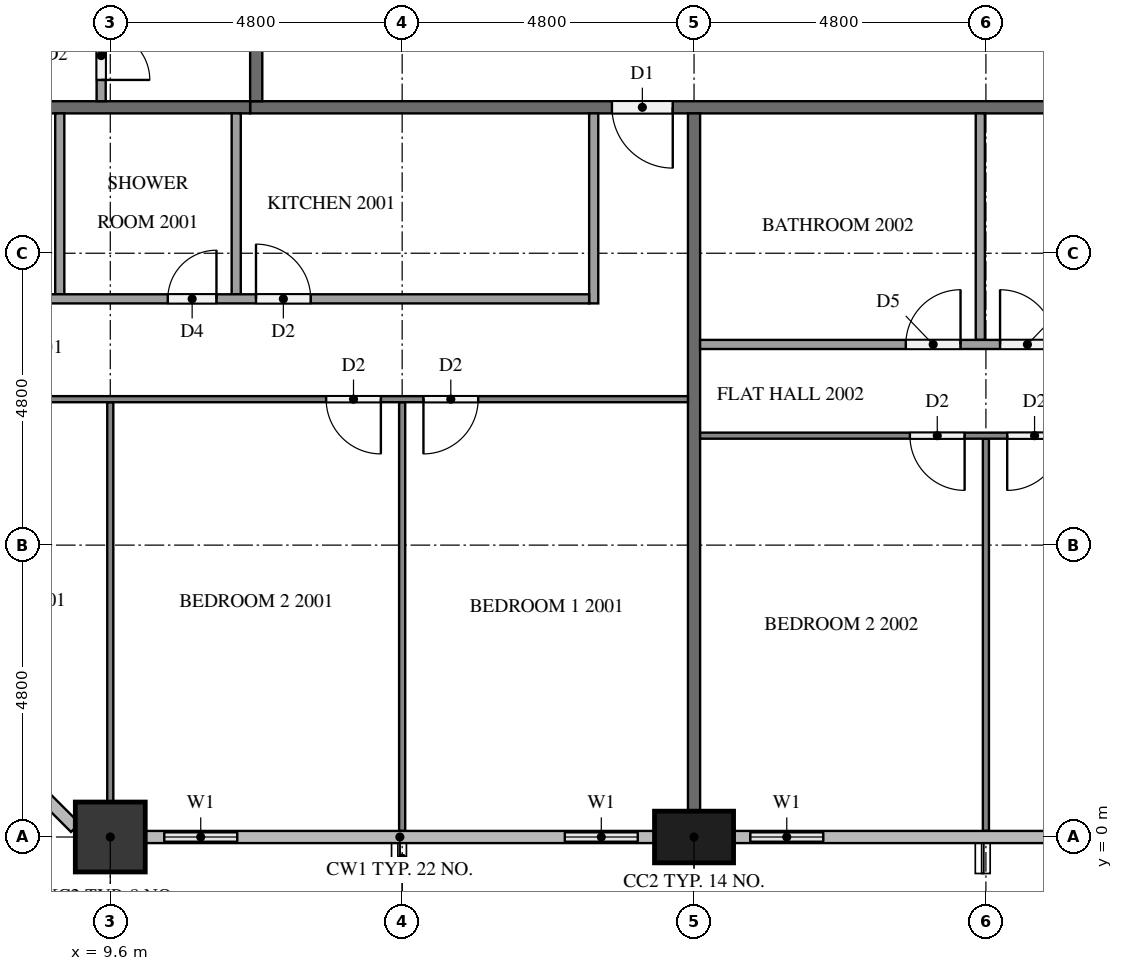
"""IFC4 building model, lengths in metres.
Left out: names, types, materials, properties, quantities, classifications, styles, units other than length and angle.
Written with IfcOpenShell. Run it as: python <this file> out.ifc"""

import sys

from ifc_helpers import new_model, si_unit, direction, frame, frame_2d, origin, origin_2d, place, context, subcontext, project, spatial, rectangle, extrude, element, fill, save


model = new_model("IFC4")
c1 = context("Model", 3, precision=1e-05, world=origin(), true_north=direction((0.0, 1.0)))
c2 = subcontext(c1, "Body", "Model", "MODEL_VIEW")
j1 = project(units=[si_unit("LENGTHUNIT", "METRE"), si_unit("PLANEANGLEUNIT", "RADIAN")], contexts=[c1])
p1 = place(None, origin())
s1 = spatial("IfcSite", under=j1, at=p1, CompositionType="ELEMENT")
p2 = place(p1, origin())
s2 = spatial("IfcBuilding", under=s1, at=p2, CompositionType="ELEMENT")
p3 = place(p2, frame((0.0, 0.0, 80.3)))
s3 = spatial("IfcBuildingStorey", under=s2, at=p3, CompositionType="ELEMENT", Elevation=80.3)
p4 = place(p3, frame((9.6, 0.0, 0.0), z_axis=(0.0, 0.0, 1.0), x_axis=(1.0, 0.0, 0.0)))
e1 = element("IfcColumn", 1, at=p4, inside=s3, PredefinedType="COLUMN", context=c2, shape_type="SweptSolid", body=[
    extrude(rectangle(XDim=1.15, YDim=1.15, at=origin_2d()), origin(), (0.0, 0.0, 1.0), 3.1),
])
p5 = place(p3, frame((19.2, 0.0, 0.0), z_axis=(0.0, 0.0, 1.0), x_axis=(1.0, 0.0, 0.0)))
e2 = element("IfcColumn", 2, at=p5, inside=s3, PredefinedType="COLUMN", context=c2, shape_type="SweptSolid", body=[
    extrude(rectangle(XDim=1.3, YDim=0.85, at=origin_2d()), origin(), (0.0, 0.0, 1.0), 3.1),
])
p6 = place(p3, frame((10.175, 0.0, 0.0), z_axis=(0.0, 0.0, 1.0), x_axis=(1.0, 0.0, 0.0)))
e3 = element("IfcWall", 3, at=p6, inside=s3, PredefinedType="SOLIDWALL", context=c2, shape_type="SweptSolid", body=[
    extrude(rectangle(XDim=1.825, YDim=0.15, at=frame_2d((0.913, 0.0))), origin(), (0.0, 0.0, 1.0), 3.1),
])
p7 = place(p6, frame((0.312, 0.0, 0.9)))
e4 = element("IfcOpeningElement", 4, at=p7, cuts=e3, PredefinedType="OPENING", context=c2, shape_type="SweptSolid", body=[
    extrude(rectangle(XDim=1.2, YDim=1.4, at=frame_2d((0.6, 0.7))), frame((0.0, 0.085, 0.0), z_axis=(0.0, -1.0, 0.0), x_axis=(1.0, 0.0, 0.0)), (0.0, 0.0, 1.0), 0.17),
])
p8 = place(p3, frame((16.8, 0.0, 0.0), z_axis=(0.0, 0.0, 1.0), x_axis=(1.0, 0.0, 0.0)))
e5 = element("IfcWall", 5, at=p8, inside=s3, PredefinedType="SOLIDWALL", context=c2, shape_type="SweptSolid", body=[
    extrude(rectangle(XDim=1.75, YDim=0.15, at=frame_2d((0.875, 0.0))), origin(), (0.0, 0.0, 1.0), 3.1),
])
p9 = place(p8, frame((0.275, 0.0, 0.9)))
e6 = element("IfcOpeningElement", 6, at=p9, cuts=e5, PredefinedType="OPENING", context=c2, shape_type="SweptSolid", body=[
    extrude(rectangle(XDim=1.2, YDim=1.4, at=frame_2d((0.6, 0.7))), frame((0.0, 0.085, 0.0), z_axis=(0.0, -1.0, 0.0), x_axis=(1.0, 0.0, 0.0)), (0.0, 0.0, 1.0), 0.17),
])
p10 = place(p3, frame((19.85, 0.0, 0.0), z_axis=(0.0, 0.0, 1.0), x_axis=(1.0, 0.0, 0.0)))
e7 = element("IfcWall", 7, at=p10, inside=s3, PredefinedType="SOLIDWALL", context=c2, shape_type="SweptSolid", body=[
    extrude(rectangle(XDim=1.75, YDim=0.15, at=frame_2d((0.875, 0.0))), origin(), (0.0, 0.0, 1.0), 3.1),
])
p11 = place(p10, frame((0.275, 0.0, 0.9)))
e8 = element("IfcOpeningElement", 8, at=p11, cuts=e7, PredefinedType="OPENING", context=c2, shape_type="SweptSolid", body=[
    extrude(rectangle(XDim=1.2, YDim=1.4, at=frame_2d((0.6, 0.7))), frame((0.0, 0.085, 0.0), z_axis=(0.0, -1.0, 0.0), x_axis=(1.0, 0.0, 0.0)), (0.0, 0.0, 1.0), 0.17),
])
p12 = place(p3, frame((50.5, 12.0, 0.0), z_axis=(0.0, 0.0, 1.0), x_axis=(-1.0, 0.0, 0.0)))
e9 = element("IfcWall", 9, at=p12, inside=s3, PredefinedType="PARTITIONING", context=c2, shape_type="SweptSolid", body=[
    extrude(rectangle(XDim=38.6, YDim=0.2, at=frame_2d((19.3, 0.0))), origin(), (0.0, 0.0, 1.0), 3.1),
])
p13 = place(p12, frame((31.65, 0.0, 0.0)))
e10 = element("IfcOpeningElement", 10, at=p13, cuts=e9, PredefinedType="OPENING", context=c2, shape_type="SweptSolid", body=[
    extrude(rectangle(XDim=1.0, YDim=2.1, at=frame_2d((0.5, 1.05))), frame((0.0, 0.11, 0.0), z_axis=(0.0, -1.0, 0.0), x_axis=(1.0, 0.0, 0.0)), (0.0, 0.0, 1.0), 0.22),
])
p14 = place(p12, frame((14.85, 0.0, 0.0)))
e11 = element("IfcOpeningElement", 11, at=p14, cuts=e9, PredefinedType="OPENING", context=c2, shape_type="SweptSolid", body=[
    extrude(rectangle(XDim=1.0, YDim=2.1, at=frame_2d((0.5, 1.05))), frame((0.0, 0.11, 0.0), z_axis=(0.0, -1.0, 0.0), x_axis=(1.0, 0.0, 0.0)), (0.0, 0.0, 1.0), 0.22),
])
p15 = place(p12, frame((13.15, 0.0, 0.0)))
e12 = element("IfcOpeningElement", 12, at=p15, cuts=e9, PredefinedType="OPENING", context=c2, shape_type="SweptSolid", body=[
    extrude(rectangle(XDim=1.0, YDim=2.1, at=frame_2d((0.5, 1.05))), frame((0.0, 0.11, 0.0), z_axis=(0.0, -1.0, 0.0), x_axis=(1.0, 0.0, 0.0)), (0.0, 0.0, 1.0), 0.22),
])
p16 = place(p3, frame((12.0, 12.1, 0.0), z_axis=(0.0, 0.0, 1.0), x_axis=(0.0, 1.0, 0.0)))
e13 = element("IfcWall", 13, at=p16, inside=s3, PredefinedType="PARTITIONING", context=c2, shape_type="SweptSolid", body=[
    extrude(rectangle(XDim=28.6, YDim=0.2, at=frame_2d((14.3, 0.0))), origin(), (0.0, 0.0, 1.0), 3.1),
])
p17 = place(p16, frame((17.05, 0.0, 0.0)))
e14 = element("IfcOpeningElement", 14, at=p17, cuts=e13, PredefinedType="OPENING", context=c2, shape_type="SweptSolid", body=[
    extrude(rectangle(XDim=1.0, YDim=2.1, at=frame_2d((0.5, 1.05))), frame((0.0, 0.11, 0.0), z_axis=(0.0, -1.0, 0.0), x_axis=(1.0, 0.0, 0.0)), (0.0, 0.0, 1.0), 0.22),
])
p18 = place(p16, frame((15.35, 0.0, 0.0)))
e15 = element("IfcOpeningElement", 15, at=p18, cuts=e13, PredefinedType="OPENING", context=c2, shape_type="SweptSolid", body=[
    extrude(rectangle(XDim=1.0, YDim=2.1, at=frame_2d((0.5, 1.05))), frame((0.0, 0.11, 0.0), z_axis=(0.0, -1.0, 0.0), x_axis=(1.0, 0.0, 0.0)), (0.0, 0.0, 1.0), 0.22),
])
p19 = place(p16, frame((8.15, 0.0, 0.0)))
e16 = element("IfcOpeningElement", 16, at=p19, cuts=e13, PredefinedType="OPENING", context=c2, shape_type="SweptSolid", body=[
    extrude(rectangle(XDim=1.0, YDim=2.1, at=frame_2d((0.5, 1.05))), frame((0.0, 0.11, 0.0), z_axis=(0.0, -1.0, 0.0), x_axis=(1.0, 0.0, 0.0)), (0.0, 0.0, 1.0), 0.22),
])
p20 = place(p3, frame((19.2, 11.9, 0.0), z_axis=(0.0, 0.0, 1.0), x_axis=(0.0, -1.0, 0.0)))
e17 = element("IfcWall", 17, at=p20, inside=s3, PredefinedType="PARTITIONING", context=c2, shape_type="SweptSolid", body=[
    extrude(rectangle(XDim=11.475, YDim=0.2, at=frame_2d((5.737, 0.0))), origin(), (0.0, 0.0, 1.0), 3.1),
])
p21 = place(p3, frame((4.9, 12.0, 0.0), z_axis=(0.0, 0.0, 1.0), x_axis=(1.0, 0.0, 0.0)))
e18 = element("IfcWall", 18, at=p21, inside=s3, PredefinedType="PARTITIONING", context=c2, shape_type="SweptSolid", body=[
    extrude(rectangle(XDim=7.0, YDim=0.2, at=frame_2d((3.5, 0.0))), origin(), (0.0, 0.0, 1.0), 3.1),
])
p22 = place(p3, frame((14.4, 7.15, 0.0), z_axis=(0.0, 0.0, 1.0), x_axis=(0.0, -1.0, 0.0)))
e19 = element("IfcWall", 19, at=p22, inside=s3, PredefinedType="PARTITIONING", context=c2, shape_type="SweptSolid", body=[
    extrude(rectangle(XDim=7.05, YDim=0.1, at=frame_2d((3.525, 0.0))), origin(), (0.0, 0.0, 1.0), 3.1),
])
p23 = place(p3, frame((9.6, 7.15, 0.0), z_axis=(0.0, 0.0, 1.0), x_axis=(0.0, -1.0, 0.0)))
e20 = element("IfcWall", 20, at=p23, inside=s3, PredefinedType="PARTITIONING", context=c2, shape_type="SweptSolid", body=[
    extrude(rectangle(XDim=6.575, YDim=0.1, at=frame_2d((3.288, 0.0))), origin(), (0.0, 0.0, 1.0), 3.1),
])
p24 = place(p3, frame((19.1, 7.2, 0.0), z_axis=(0.0, 0.0, 1.0), x_axis=(-1.0, 0.0, 0.0)))
e21 = element("IfcWall", 21, at=p24, inside=s3, PredefinedType="PARTITIONING", context=c2, shape_type="SweptSolid", body=[
    extrude(rectangle(XDim=14.2, YDim=0.1, at=frame_2d((7.1, 0.0))), origin(), (0.0, 0.0, 1.0), 3.1),
])
p25 = place(p24, frame((3.45, 0.0, 0.0)))
e22 = element("IfcOpeningElement", 22, at=p25, cuts=e21, PredefinedType="OPENING", context=c2, shape_type="SweptSolid", body=[
    extrude(rectangle(XDim=0.9, YDim=2.1, at=frame_2d((0.45, 1.05))), frame((0.0, 0.06, 0.0), z_axis=(0.0, -1.0, 0.0), x_axis=(1.0, 0.0, 0.0)), (0.0, 0.0, 1.0), 0.12),
])
p26 = place(p24, frame((5.05, 0.0, 0.0)))
e23 = element("IfcOpeningElement", 23, at=p26, cuts=e21, PredefinedType="OPENING", context=c2, shape_type="SweptSolid", body=[
    extrude(rectangle(XDim=0.9, YDim=2.1, at=frame_2d((0.45, 1.05))), frame((0.0, 0.06, 0.0), z_axis=(0.0, -1.0, 0.0), x_axis=(1.0, 0.0, 0.0)), (0.0, 0.0, 1.0), 0.12),
])
p27 = place(p24, frame((12.9, 0.0, 0.0)))
e24 = element("IfcOpeningElement", 24, at=p27, cuts=e21, PredefinedType="OPENING", context=c2, shape_type="SweptSolid", body=[
    extrude(rectangle(XDim=1.0, YDim=2.1, at=frame_2d((0.5, 1.05))), frame((0.0, 0.06, 0.0), z_axis=(0.0, -1.0, 0.0), x_axis=(1.0, 0.0, 0.0)), (0.0, 0.0, 1.0), 0.12),
])
for number, where, z_axis, x_axis in (
    (25, (11.671, 11.9, 0.0), (0.0, 0.0, 1.0), (0.0, -1.0, 0.0)),
    (26, (8.769, 11.9, 0.0), (0.0, 0.0, 1.0), (0.0, -1.0, 0.0)),
):
    element("IfcWall", number, at=place(p3, frame(where, z_axis=z_axis, x_axis=x_axis)), inside=s3, PredefinedType="PARTITIONING", context=c2, shape_type="SweptSolid", body=[
        extrude(rectangle(XDim=2.975, YDim=0.15, at=frame_2d((1.487, 0.0))), origin(), (0.0, 0.0, 1.0), 3.1),
    ])
p28 = place(p3, frame((17.55, 11.9, 0.0), z_axis=(0.0, 0.0, 1.0), x_axis=(0.0, -1.0, 0.0)))
e27 = element("IfcWall", 27, at=p28, inside=s3, PredefinedType="PARTITIONING", context=c2, shape_type="SweptSolid", body=[
    extrude(rectangle(XDim=3.125, YDim=0.15, at=frame_2d((1.562, 0.0))), origin(), (0.0, 0.0, 1.0), 3.1),
])
p29 = place(p3, frame((4.9, 8.85, 0.0), z_axis=(0.0, 0.0, 1.0), x_axis=(1.0, 0.0, 0.0)))
e28 = element("IfcWall", 28, at=p29, inside=s3, PredefinedType="PARTITIONING", context=c2, shape_type="SweptSolid", body=[
    extrude(rectangle(XDim=12.575, YDim=0.15, at=frame_2d((6.288, 0.0))), origin(), (0.0, 0.0, 1.0), 3.1),
])
p30 = place(p29, frame((7.096, 0.0, 0.0)))
e29 = element("IfcOpeningElement", 29, at=p30, cuts=e28, PredefinedType="OPENING", context=c2, shape_type="SweptSolid", body=[
    extrude(rectangle(XDim=0.9, YDim=2.1, at=frame_2d((0.45, 1.05))), frame((0.0, 0.085, 0.0), z_axis=(0.0, -1.0, 0.0), x_axis=(1.0, 0.0, 0.0)), (0.0, 0.0, 1.0), 0.17),
])
p31 = place(p29, frame((5.646, 0.0, 0.0)))
e30 = element("IfcOpeningElement", 30, at=p31, cuts=e28, PredefinedType="OPENING", context=c2, shape_type="SweptSolid", body=[
    extrude(rectangle(XDim=0.8, YDim=2.1, at=frame_2d((0.4, 1.05))), frame((0.0, 0.085, 0.0), z_axis=(0.0, -1.0, 0.0), x_axis=(1.0, 0.0, 0.0)), (0.0, 0.0, 1.0), 0.17),
])
p32 = place(p29, frame((0.35, 0.0, 0.0)))
e31 = element("IfcOpeningElement", 31, at=p32, cuts=e28, PredefinedType="OPENING", context=c2, shape_type="SweptSolid", body=[
    extrude(rectangle(XDim=0.9, YDim=2.1, at=frame_2d((0.45, 1.05))), frame((0.0, 0.085, 0.0), z_axis=(0.0, -1.0, 0.0), x_axis=(1.0, 0.0, 0.0)), (0.0, 0.0, 1.0), 0.17),
])
p33 = place(p3, frame((24.0, 6.55, 0.0), z_axis=(0.0, 0.0, 1.0), x_axis=(0.0, -1.0, 0.0)))
e32 = element("IfcWall", 32, at=p33, inside=s3, PredefinedType="PARTITIONING", context=c2, shape_type="SweptSolid", body=[
    extrude(rectangle(XDim=6.45, YDim=0.1, at=frame_2d((3.225, 0.0))), origin(), (0.0, 0.0, 1.0), 3.1),
])
p34 = place(p3, frame((35.9, 6.6, 0.0), z_axis=(0.0, 0.0, 1.0), x_axis=(-1.0, 0.0, 0.0)))
e33 = element("IfcWall", 33, at=p34, inside=s3, PredefinedType="PARTITIONING", context=c2, shape_type="SweptSolid", body=[
    extrude(rectangle(XDim=16.6, YDim=0.1, at=frame_2d((8.3, 0.0))), origin(), (0.0, 0.0, 1.0), 3.1),
])
p35 = place(p34, frame((0.3, 0.0, 0.0)))
e34 = element("IfcOpeningElement", 34, at=p35, cuts=e33, PredefinedType="OPENING", context=c2, shape_type="SweptSolid", body=[
    extrude(rectangle(XDim=1.0, YDim=2.1, at=frame_2d((0.5, 1.05))), frame((0.0, 0.06, 0.0), z_axis=(0.0, -1.0, 0.0), x_axis=(1.0, 0.0, 0.0)), (0.0, 0.0, 1.0), 0.12),
])
p36 = place(p34, frame((10.65, 0.0, 0.0)))
e35 = element("IfcOpeningElement", 35, at=p36, cuts=e33, PredefinedType="OPENING", context=c2, shape_type="SweptSolid", body=[
    extrude(rectangle(XDim=0.9, YDim=2.1, at=frame_2d((0.45, 1.05))), frame((0.0, 0.06, 0.0), z_axis=(0.0, -1.0, 0.0), x_axis=(1.0, 0.0, 0.0)), (0.0, 0.0, 1.0), 0.12),
])
p37 = place(p34, frame((12.25, 0.0, 0.0)))
e36 = element("IfcOpeningElement", 36, at=p37, cuts=e33, PredefinedType="OPENING", context=c2, shape_type="SweptSolid", body=[
    extrude(rectangle(XDim=0.9, YDim=2.1, at=frame_2d((0.45, 1.05))), frame((0.0, 0.06, 0.0), z_axis=(0.0, -1.0, 0.0), x_axis=(1.0, 0.0, 0.0)), (0.0, 0.0, 1.0), 0.12),
])
p38 = place(p3, frame((23.908, 11.9, 0.0), z_axis=(0.0, 0.0, 1.0), x_axis=(0.0, -1.0, 0.0)))
e37 = element("IfcWall", 37, at=p38, inside=s3, PredefinedType="PARTITIONING", context=c2, shape_type="SweptSolid", body=[
    extrude(rectangle(XDim=3.725, YDim=0.15, at=frame_2d((1.862, 0.0))), origin(), (0.0, 0.0, 1.0), 3.1),
])
p39 = place(p3, frame((19.3, 8.1, 0.0), z_axis=(0.0, 0.0, 1.0), x_axis=(1.0, 0.0, 0.0)))
e38 = element("IfcWall", 38, at=p39, inside=s3, PredefinedType="PARTITIONING", context=c2, shape_type="SweptSolid", body=[
    extrude(rectangle(XDim=14.975, YDim=0.15, at=frame_2d((7.487, 0.0))), origin(), (0.0, 0.0, 1.0), 3.1),
])
p40 = place(p39, frame((13.875, 0.0, 0.0)))
e39 = element("IfcOpeningElement", 39, at=p40, cuts=e38, PredefinedType="OPENING", context=c2, shape_type="SweptSolid", body=[
    extrude(rectangle(XDim=0.8, YDim=2.1, at=frame_2d((0.4, 1.05))), frame((0.0, 0.085, 0.0), z_axis=(0.0, -1.0, 0.0), x_axis=(1.0, 0.0, 0.0)), (0.0, 0.0, 1.0), 0.17),
])
p41 = place(p39, frame((4.933, 0.0, 0.0)))
e40 = element("IfcOpeningElement", 40, at=p41, cuts=e38, PredefinedType="OPENING", context=c2, shape_type="SweptSolid", body=[
    extrude(rectangle(XDim=0.9, YDim=2.1, at=frame_2d((0.45, 1.05))), frame((0.0, 0.085, 0.0), z_axis=(0.0, -1.0, 0.0), x_axis=(1.0, 0.0, 0.0)), (0.0, 0.0, 1.0), 0.17),
])
p42 = place(p39, frame((3.383, 0.0, 0.0)))
e41 = element("IfcOpeningElement", 41, at=p42, cuts=e38, PredefinedType="OPENING", context=c2, shape_type="SweptSolid", body=[
    extrude(rectangle(XDim=0.9, YDim=2.1, at=frame_2d((0.45, 1.05))), frame((0.0, 0.085, 0.0), z_axis=(0.0, -1.0, 0.0), x_axis=(1.0, 0.0, 0.0)), (0.0, 0.0, 1.0), 0.17),
])
p43 = place(p3, frame((9.45, 19.875, 0.0), z_axis=(0.0, 0.0, 1.0), x_axis=(0.0, -1.0, 0.0)))
e42 = element("IfcWall", 42, at=p43, inside=s3, PredefinedType="PARTITIONING", context=c2, shape_type="SweptSolid", body=[
    extrude(rectangle(XDim=7.775, YDim=0.15, at=frame_2d((3.887, 0.0))), origin(), (0.0, 0.0, 1.0), 3.1),
])
p44 = place(p43, frame((0.3, 0.0, 0.0)))
e43 = element("IfcOpeningElement", 43, at=p44, cuts=e42, PredefinedType="OPENING", context=c2, shape_type="SweptSolid", body=[
    extrude(rectangle(XDim=0.9, YDim=2.1, at=frame_2d((0.45, 1.05))), frame((0.0, 0.085, 0.0), z_axis=(0.0, -1.0, 0.0), x_axis=(1.0, 0.0, 0.0)), (0.0, 0.0, 1.0), 0.17),
])
p45 = place(p43, frame((6.625, 0.0, 0.0)))
e44 = element("IfcOpeningElement", 44, at=p45, cuts=e42, PredefinedType="OPENING", context=c2, shape_type="SweptSolid", body=[
    extrude(rectangle(XDim=0.8, YDim=2.1, at=frame_2d((0.4, 1.05))), frame((0.0, 0.085, 0.0), z_axis=(0.0, -1.0, 0.0), x_axis=(1.0, 0.0, 0.0)), (0.0, 0.0, 1.0), 0.17),
])
p46 = place(p7, origin())
e45 = element("IfcWindow", 45, at=p46, inside=s3, PartitioningType="SINGLE_PANEL", PredefinedType="WINDOW", context=c2, shape_type="SweptSolid", body=[
    extrude(rectangle(XDim=1.2, YDim=1.4, at=frame_2d((0.6, 0.7))), frame((0.0, 0.03, 0.0), z_axis=(0.0, -1.0, 0.0), x_axis=(1.0, 0.0, 0.0)), (0.0, 0.0, 1.0), 0.06),
])
fill(e4, e45)
p47 = place(p9, origin())
e46 = element("IfcWindow", 46, at=p47, inside=s3, PartitioningType="SINGLE_PANEL", PredefinedType="WINDOW", context=c2, shape_type="SweptSolid", body=[
    extrude(rectangle(XDim=1.2, YDim=1.4, at=frame_2d((0.6, 0.7))), frame((0.0, 0.03, 0.0), z_axis=(0.0, -1.0, 0.0), x_axis=(1.0, 0.0, 0.0)), (0.0, 0.0, 1.0), 0.06),
])
fill(e6, e46)
p48 = place(p11, origin())
e47 = element("IfcWindow", 47, at=p48, inside=s3, PartitioningType="SINGLE_PANEL", PredefinedType="WINDOW", context=c2, shape_type="SweptSolid", body=[
    extrude(rectangle(XDim=1.2, YDim=1.4, at=frame_2d((0.6, 0.7))), frame((0.0, 0.03, 0.0), z_axis=(0.0, -1.0, 0.0), x_axis=(1.0, 0.0, 0.0)), (0.0, 0.0, 1.0), 0.06),
])
fill(e8, e47)
p49 = place(p13, origin())
e48 = element("IfcDoor", 48, at=p49, inside=s3, OperationType="SINGLE_SWING_LEFT", PredefinedType="DOOR", context=c2, shape_type="SweptSolid", body=[
    extrude(rectangle(XDim=1.0, YDim=2.1, at=frame_2d((0.5, 1.05))), frame((0.0, 0.025, 0.0), z_axis=(0.0, -1.0, 0.0), x_axis=(1.0, 0.0, 0.0)), (0.0, 0.0, 1.0), 0.05),
])
fill(e10, e48)
p50 = place(p25, origin())
e49 = element("IfcDoor", 49, at=p50, inside=s3, OperationType="SINGLE_SWING_RIGHT", PredefinedType="DOOR", context=c2, shape_type="SweptSolid", body=[
    extrude(rectangle(XDim=0.9, YDim=2.1, at=frame_2d((0.45, 1.05))), frame((0.0, 0.025, 0.0), z_axis=(0.0, -1.0, 0.0), x_axis=(1.0, 0.0, 0.0)), (0.0, 0.0, 1.0), 0.05),
])
fill(e22, e49)
p51 = place(p26, origin())
e50 = element("IfcDoor", 50, at=p51, inside=s3, OperationType="SINGLE_SWING_LEFT", PredefinedType="DOOR", context=c2, shape_type="SweptSolid", body=[
    extrude(rectangle(XDim=0.9, YDim=2.1, at=frame_2d((0.45, 1.05))), frame((0.0, 0.025, 0.0), z_axis=(0.0, -1.0, 0.0), x_axis=(1.0, 0.0, 0.0)), (0.0, 0.0, 1.0), 0.05),
])
fill(e23, e50)
p52 = place(p30, origin())
e51 = element("IfcDoor", 51, at=p52, inside=s3, OperationType="SINGLE_SWING_LEFT", PredefinedType="DOOR", context=c2, shape_type="SweptSolid", body=[
    extrude(rectangle(XDim=0.9, YDim=2.1, at=frame_2d((0.45, 1.05))), frame((0.0, 0.025, 0.0), z_axis=(0.0, -1.0, 0.0), x_axis=(1.0, 0.0, 0.0)), (0.0, 0.0, 1.0), 0.05),
])
fill(e29, e51)
p53 = place(p31, origin())
e52 = element("IfcDoor", 52, at=p53, inside=s3, OperationType="SINGLE_SWING_RIGHT", PredefinedType="DOOR", context=c2, shape_type="SweptSolid", body=[
    extrude(rectangle(XDim=0.8, YDim=2.1, at=frame_2d((0.4, 1.05))), frame((0.0, 0.025, 0.0), z_axis=(0.0, -1.0, 0.0), x_axis=(1.0, 0.0, 0.0)), (0.0, 0.0, 1.0), 0.05),
])
fill(e30, e52)
p54 = place(p36, origin())
e53 = element("IfcDoor", 53, at=p54, inside=s3, OperationType="SINGLE_SWING_RIGHT", PredefinedType="DOOR", context=c2, shape_type="SweptSolid", body=[
    extrude(rectangle(XDim=0.9, YDim=2.1, at=frame_2d((0.45, 1.05))), frame((0.0, 0.025, 0.0), z_axis=(0.0, -1.0, 0.0), x_axis=(1.0, 0.0, 0.0)), (0.0, 0.0, 1.0), 0.05),
])
fill(e35, e53)
p55 = place(p37, origin())
e54 = element("IfcDoor", 54, at=p55, inside=s3, OperationType="SINGLE_SWING_LEFT", PredefinedType="DOOR", context=c2, shape_type="SweptSolid", body=[
    extrude(rectangle(XDim=0.9, YDim=2.1, at=frame_2d((0.45, 1.05))), frame((0.0, 0.025, 0.0), z_axis=(0.0, -1.0, 0.0), x_axis=(1.0, 0.0, 0.0)), (0.0, 0.0, 1.0), 0.05),
])
fill(e36, e54)
p56 = place(p41, origin())
e55 = element("IfcDoor", 55, at=p56, inside=s3, OperationType="SINGLE_SWING_LEFT", PredefinedType="DOOR", context=c2, shape_type="SweptSolid", body=[
    extrude(rectangle(XDim=0.9, YDim=2.1, at=frame_2d((0.45, 1.05))), frame((0.0, 0.025, 0.0), z_axis=(0.0, -1.0, 0.0), x_axis=(1.0, 0.0, 0.0)), (0.0, 0.0, 1.0), 0.05),
])
fill(e40, e55)
p57 = place(p42, origin())
e56 = element("IfcDoor", 56, at=p57, inside=s3, OperationType="SINGLE_SWING_RIGHT", PredefinedType="DOOR", context=c2, shape_type="SweptSolid", body=[
    extrude(rectangle(XDim=0.9, YDim=2.1, at=frame_2d((0.45, 1.05))), frame((0.0, 0.025, 0.0), z_axis=(0.0, -1.0, 0.0), x_axis=(1.0, 0.0, 0.0)), (0.0, 0.0, 1.0), 0.05),
])
fill(e41, e56)
p58 = place(p45, origin())
e57 = element("IfcDoor", 57, at=p58, inside=s3, OperationType="SINGLE_SWING_RIGHT", PredefinedType="DOOR", context=c2, shape_type="SweptSolid", body=[
    extrude(rectangle(XDim=0.8, YDim=2.1, at=frame_2d((0.4, 1.05))), frame((0.0, 0.025, 0.0), z_axis=(0.0, -1.0, 0.0), x_axis=(1.0, 0.0, 0.0)), (0.0, 0.0, 1.0), 0.05),
])
fill(e44, e57)
save(model, sys.argv[1])
